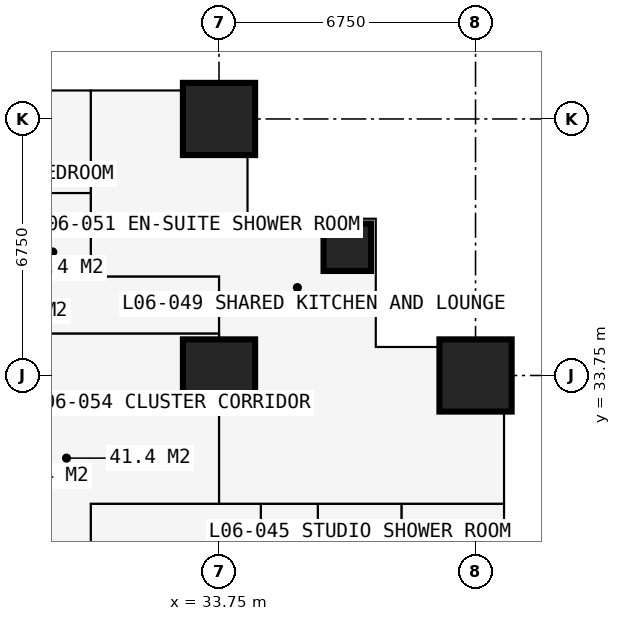
"""IFC4 building model, lengths in metres.
Left out: names, types, materials, properties, quantities, classifications, styles, units other than length and angle.
Written with IfcOpenShell. Run it as: python <this file> out.ifc"""

import sys

from ifc_helpers import new_model, si_unit, direction, frame, frame_2d, origin, origin_2d, place, context, subcontext, project, spatial, rectangle, extrude, element, fill, save


model = new_model("IFC4")
c1 = context("Model", 3, precision=1e-05, world=origin(), true_north=direction((0.0, 1.0)))
c2 = subcontext(c1, "Body", "Model", "MODEL_VIEW")
j1 = project(units=[si_unit("LENGTHUNIT", "METRE"), si_unit("PLANEANGLEUNIT", "RADIAN")], contexts=[c1])
p1 = place(None, origin())
s1 = spatial("IfcSite", under=j1, at=p1, CompositionType="ELEMENT")
p2 = place(p1, origin())
s2 = spatial("IfcBuilding", under=s1, at=p2, CompositionType="ELEMENT")
p3 = place(p2, frame((0.0, 0.0, 25.2)))
s3 = spatial("IfcBuildingStorey", under=s2, at=p3, CompositionType="ELEMENT", Elevation=25.2)
for number, where, z_axis, x_axis in (
    (1, (33.75, 33.75, 0.0), (0.0, 0.0, 1.0), (1.0, 0.0, 0.0)),
    (2, (33.75, 40.5, 0.0), (0.0, 0.0, 1.0), (1.0, 0.0, 0.0)),
):
    element("IfcColumn", number, at=place(p3, frame(where, z_axis=z_axis, x_axis=x_axis)), inside=s3, PredefinedType="COLUMN", context=c2, shape_type="SweptSolid", body=[
        extrude(rectangle(XDim=1.9, YDim=1.9, at=origin_2d()), origin(), (0.0, 0.0, 1.0), 3.6),
    ])
p4 = place(p3, frame((37.125, 37.125, 0.0), z_axis=(0.0, 0.0, 1.0), x_axis=(1.0, 0.0, 0.0)))
e3 = element("IfcColumn", 3, at=p4, inside=s3, PredefinedType="COLUMN", context=c2, shape_type="SweptSolid", body=[
    extrude(rectangle(XDim=1.25, YDim=1.25, at=origin_2d()), origin(), (0.0, 0.0, 1.0), 3.6),
])
p5 = place(p3, frame((40.5, 33.75, 0.0), z_axis=(0.0, 0.0, 1.0), x_axis=(1.0, 0.0, 0.0)))
e4 = element("IfcColumn", 4, at=p5, inside=s3, PredefinedType="COLUMN", context=c2, shape_type="SweptSolid", body=[
    extrude(rectangle(XDim=1.9, YDim=1.9, at=origin_2d()), origin(), (0.0, 0.0, 1.0), 3.6),
])
p6 = place(p3, frame((41.25, 34.5, 0.0), z_axis=(0.0, 0.0, 1.0), x_axis=(-1.0, 0.0, 0.0)))
e5 = element("IfcWall", 5, at=p6, inside=s3, PredefinedType="SOLIDWALL", context=c2, shape_type="SweptSolid", body=[
    extrude(rectangle(XDim=3.375, YDim=0.3, at=frame_2d((1.688, 0.0))), origin(), (0.0, 0.0, 1.0), 3.375),
])
p7 = place(p6, frame((1.857, 0.0, 0.9)))
e6 = element("IfcOpeningElement", 6, at=p7, cuts=e5, PredefinedType="OPENING", context=c2, shape_type="SweptSolid", body=[
    extrude(rectangle(XDim=1.2, YDim=1.8, at=frame_2d((0.6, 0.9))), frame((0.0, 0.16, 0.0), z_axis=(0.0, -1.0, 0.0), x_axis=(1.0, 0.0, 0.0)), (0.0, 0.0, 1.0), 0.32),
])
p8 = place(p3, frame((37.875, 34.5, 0.0), z_axis=(0.0, 0.0, 1.0), x_axis=(0.0, 1.0, 0.0)))
e7 = element("IfcWall", 7, at=p8, inside=s3, PredefinedType="SOLIDWALL", context=c2, shape_type="SweptSolid", body=[
    extrude(rectangle(XDim=3.375, YDim=0.3, at=frame_2d((1.688, 0.0))), origin(), (0.0, 0.0, 1.0), 3.375),
])
p9 = place(p8, frame((0.788, 0.0, 0.6)))
e8 = element("IfcOpeningElement", 8, at=p9, cuts=e7, PredefinedType="OPENING", context=c2, shape_type="SweptSolid", body=[
    extrude(rectangle(XDim=1.8, YDim=2.1, at=frame_2d((0.9, 1.05))), frame((0.0, 0.16, 0.0), z_axis=(0.0, -1.0, 0.0), x_axis=(1.0, 0.0, 0.0)), (0.0, 0.0, 1.0), 0.32),
])
p10 = place(p3, frame((37.875, 37.875, 0.0), z_axis=(0.0, 0.0, 1.0), x_axis=(-1.0, 0.0, 0.0)))
e9 = element("IfcWall", 9, at=p10, inside=s3, PredefinedType="SOLIDWALL", context=c2, shape_type="SweptSolid", body=[
    extrude(rectangle(XDim=3.375, YDim=0.3, at=frame_2d((1.688, 0.0))), origin(), (0.0, 0.0, 1.0), 3.375),
])
p11 = place(p10, frame((0.788, 0.0, 0.6)))
e10 = element("IfcOpeningElement", 10, at=p11, cuts=e9, PredefinedType="OPENING", context=c2, shape_type="SweptSolid", body=[
    extrude(rectangle(XDim=1.8, YDim=2.1, at=frame_2d((0.9, 1.05))), frame((0.0, 0.16, 0.0), z_axis=(0.0, -1.0, 0.0), x_axis=(1.0, 0.0, 0.0)), (0.0, 0.0, 1.0), 0.32),
])
p12 = place(p3, frame((34.5, 37.875, 0.0), z_axis=(0.0, 0.0, 1.0), x_axis=(0.0, 1.0, 0.0)))
e11 = element("IfcWall", 11, at=p12, inside=s3, PredefinedType="SOLIDWALL", context=c2, shape_type="SweptSolid", body=[
    extrude(rectangle(XDim=3.375, YDim=0.3, at=frame_2d((1.688, 0.0))), origin(), (0.0, 0.0, 1.0), 3.375),
])
p13 = place(p12, frame((0.317, 0.0, 0.9)))
e12 = element("IfcOpeningElement", 12, at=p13, cuts=e11, PredefinedType="OPENING", context=c2, shape_type="SweptSolid", body=[
    extrude(rectangle(XDim=1.2, YDim=1.8, at=frame_2d((0.6, 0.9))), frame((0.0, 0.16, 0.0), z_axis=(0.0, -1.0, 0.0), x_axis=(1.0, 0.0, 0.0)), (0.0, 0.0, 1.0), 0.32),
])
p14 = place(p3, frame((10.125, 36.35, 0.0), z_axis=(0.0, 0.0, 1.0), x_axis=(1.0, 0.0, 0.0)))
e13 = element("IfcWall", 13, at=p14, inside=s3, PredefinedType="PARTITIONING", context=c2, shape_type="SweptSolid", body=[
    extrude(rectangle(XDim=23.625, YDim=0.1, at=frame_2d((11.812, 0.0))), origin(), (0.0, 0.0, 1.0), 3.375),
])
p15 = place(p14, frame((21.45, 0.0, 0.0)))
e14 = element("IfcOpeningElement", 14, at=p15, cuts=e13, PredefinedType="OPENING", context=c2, shape_type="SweptSolid", body=[
    extrude(rectangle(XDim=1.0, YDim=2.2, at=frame_2d((0.5, 1.1))), frame((0.0, 0.06, 0.0), z_axis=(0.0, -1.0, 0.0), x_axis=(1.0, 0.0, 0.0)), (0.0, 0.0, 1.0), 0.12),
])
p16 = place(p14, frame((17.125, 0.0, 0.0)))
e15 = element("IfcOpeningElement", 15, at=p16, cuts=e13, PredefinedType="OPENING", context=c2, shape_type="SweptSolid", body=[
    extrude(rectangle(XDim=0.95, YDim=2.2, at=frame_2d((0.475, 1.1))), frame((0.0, 0.06, 0.0), z_axis=(0.0, -1.0, 0.0), x_axis=(1.0, 0.0, 0.0)), (0.0, 0.0, 1.0), 0.12),
])
p17 = place(p14, frame((13.7, 0.0, 0.0)))
e16 = element("IfcOpeningElement", 16, at=p17, cuts=e13, PredefinedType="OPENING", context=c2, shape_type="SweptSolid", body=[
    extrude(rectangle(XDim=0.95, YDim=2.2, at=frame_2d((0.475, 1.1))), frame((0.0, 0.06, 0.0), z_axis=(0.0, -1.0, 0.0), x_axis=(1.0, 0.0, 0.0)), (0.0, 0.0, 1.0), 0.12),
])
p18 = place(p14, frame((0.2, 0.0, 0.0)))
e17 = element("IfcOpeningElement", 17, at=p18, cuts=e13, PredefinedType="OPENING", context=c2, shape_type="SweptSolid", body=[
    extrude(rectangle(XDim=0.95, YDim=2.2, at=frame_2d((0.475, 1.1))), frame((0.0, 0.06, 0.0), z_axis=(0.0, -1.0, 0.0), x_axis=(1.0, 0.0, 0.0)), (0.0, 0.0, 1.0), 0.12),
])
p19 = place(p14, frame((3.625, 0.0, 0.0)))
e18 = element("IfcOpeningElement", 18, at=p19, cuts=e13, PredefinedType="OPENING", context=c2, shape_type="SweptSolid", body=[
    extrude(rectangle(XDim=0.95, YDim=2.2, at=frame_2d((0.475, 1.1))), frame((0.0, 0.06, 0.0), z_axis=(0.0, -1.0, 0.0), x_axis=(1.0, 0.0, 0.0)), (0.0, 0.0, 1.0), 0.12),
])
p20 = place(p14, frame((7.0, 0.0, 0.0)))
e19 = element("IfcOpeningElement", 19, at=p20, cuts=e13, PredefinedType="OPENING", context=c2, shape_type="SweptSolid", body=[
    extrude(rectangle(XDim=0.95, YDim=2.2, at=frame_2d((0.475, 1.1))), frame((0.0, 0.06, 0.0), z_axis=(0.0, -1.0, 0.0), x_axis=(1.0, 0.0, 0.0)), (0.0, 0.0, 1.0), 0.12),
])
p21 = place(p14, frame((10.375, 0.0, 0.0)))
e20 = element("IfcOpeningElement", 20, at=p21, cuts=e13, PredefinedType="OPENING", context=c2, shape_type="SweptSolid", body=[
    extrude(rectangle(XDim=0.95, YDim=2.2, at=frame_2d((0.475, 1.1))), frame((0.0, 0.06, 0.0), z_axis=(0.0, -1.0, 0.0), x_axis=(1.0, 0.0, 0.0)), (0.0, 0.0, 1.0), 0.12),
])
p22 = place(p3, frame((25.725, 34.85, 0.0), z_axis=(0.0, 0.0, 1.0), x_axis=(1.0, 0.0, 0.0)))
e21 = element("IfcWall", 21, at=p22, inside=s3, PredefinedType="PARTITIONING", context=c2, shape_type="SweptSolid", body=[
    extrude(rectangle(XDim=8.025, YDim=0.15, at=frame_2d((4.012, 0.0))), origin(), (0.0, 0.0, 1.0), 3.375),
])
p23 = place(p3, frame((28.375, 38.55, 0.0), z_axis=(0.0, 0.0, 1.0), x_axis=(1.0, 0.0, 0.0)))
e22 = element("IfcWall", 22, at=p23, inside=s3, PredefinedType="PARTITIONING", context=c2, shape_type="SweptSolid", body=[
    extrude(rectangle(XDim=2.0, YDim=0.1, at=frame_2d((1.0, 0.0))), origin(), (0.0, 0.0, 1.0), 3.375),
])
p24 = place(p3, frame((30.375, 29.2, 0.0), z_axis=(0.0, 0.0, 1.0), x_axis=(0.0, 1.0, 0.0)))
e23 = element("IfcWall", 23, at=p24, inside=s3, PredefinedType="PARTITIONING", context=c2, shape_type="SweptSolid", body=[
    extrude(rectangle(XDim=1.175, YDim=0.15, at=frame_2d((0.587, 0.0))), origin(), (0.0, 0.0, 1.0), 3.375),
])
p25 = place(p3, frame((30.375, 30.375, 0.0), z_axis=(0.0, 0.0, 1.0), x_axis=(1.0, 0.0, 0.0)))
e24 = element("IfcWall", 24, at=p25, inside=s3, PredefinedType="PARTITIONING", context=c2, shape_type="SweptSolid", body=[
    extrude(rectangle(XDim=10.859, YDim=0.15, at=frame_2d((5.429, 0.0))), origin(), (0.0, 0.0, 1.0), 3.375),
])
p26 = place(p3, frame((30.375, 36.35, 0.0), z_axis=(0.0, 0.0, 1.0), x_axis=(0.0, 1.0, 0.0)))
e25 = element("IfcWall", 25, at=p26, inside=s3, PredefinedType="PARTITIONING", context=c2, shape_type="SweptSolid", body=[
    extrude(rectangle(XDim=4.884, YDim=0.15, at=frame_2d((2.442, 0.0))), origin(), (0.0, 0.0, 1.0), 3.375),
])
p27 = place(p3, frame((33.75, 30.375, 0.0), z_axis=(0.0, 0.0, 1.0), x_axis=(0.0, 1.0, 0.0)))
e26 = element("IfcWall", 26, at=p27, inside=s3, PredefinedType="PARTITIONING", context=c2, shape_type="SweptSolid", body=[
    extrude(rectangle(XDim=5.975, YDim=0.15, at=frame_2d((2.988, 0.0))), origin(), (0.0, 0.0, 1.0), 2.877),
])
p28 = place(p3, frame((34.85, 12.55, 0.0), z_axis=(0.0, 0.0, 1.0), x_axis=(0.0, 1.0, 0.0)))
e27 = element("IfcWall", 27, at=p28, inside=s3, PredefinedType="PARTITIONING", context=c2, shape_type="SweptSolid", body=[
    extrude(rectangle(XDim=17.825, YDim=0.15, at=frame_2d((8.913, 0.0))), origin(), (0.0, 0.0, 1.0), 3.375),
])
p29 = place(p28, frame((8.65, 0.0, 0.0)))
e28 = element("IfcOpeningElement", 28, at=p29, cuts=e27, PredefinedType="OPENING", context=c2, shape_type="SweptSolid", body=[
    extrude(rectangle(XDim=0.95, YDim=2.2, at=frame_2d((0.475, 1.1))), frame((0.0, 0.085, 0.0), z_axis=(0.0, -1.0, 0.0), x_axis=(1.0, 0.0, 0.0)), (0.0, 0.0, 1.0), 0.17),
])
p30 = place(p3, frame((36.35, 6.75, 0.0), z_axis=(0.0, 0.0, 1.0), x_axis=(0.0, 1.0, 0.0)))
e29 = element("IfcWall", 29, at=p30, inside=s3, PredefinedType="PARTITIONING", context=c2, shape_type="SweptSolid", body=[
    extrude(rectangle(XDim=23.625, YDim=0.1, at=frame_2d((11.812, 0.0))), origin(), (0.0, 0.0, 1.0), 3.375),
])
p31 = place(p30, frame((3.575, 0.0, 0.0)))
e30 = element("IfcOpeningElement", 30, at=p31, cuts=e29, PredefinedType="OPENING", context=c2, shape_type="SweptSolid", body=[
    extrude(rectangle(XDim=0.95, YDim=2.2, at=frame_2d((0.475, 1.1))), frame((0.0, 0.06, 0.0), z_axis=(0.0, -1.0, 0.0), x_axis=(1.0, 0.0, 0.0)), (0.0, 0.0, 1.0), 0.12),
])
p32 = place(p30, frame((7.0, 0.0, 0.0)))
e31 = element("IfcOpeningElement", 31, at=p32, cuts=e29, PredefinedType="OPENING", context=c2, shape_type="SweptSolid", body=[
    extrude(rectangle(XDim=0.95, YDim=2.2, at=frame_2d((0.475, 1.1))), frame((0.0, 0.06, 0.0), z_axis=(0.0, -1.0, 0.0), x_axis=(1.0, 0.0, 0.0)), (0.0, 0.0, 1.0), 0.12),
])
p33 = place(p30, frame((10.375, 0.0, 0.0)))
e32 = element("IfcOpeningElement", 32, at=p33, cuts=e29, PredefinedType="OPENING", context=c2, shape_type="SweptSolid", body=[
    extrude(rectangle(XDim=0.95, YDim=2.2, at=frame_2d((0.475, 1.1))), frame((0.0, 0.06, 0.0), z_axis=(0.0, -1.0, 0.0), x_axis=(1.0, 0.0, 0.0)), (0.0, 0.0, 1.0), 0.12),
])
p34 = place(p30, frame((13.75, 0.0, 0.0)))
e33 = element("IfcOpeningElement", 33, at=p34, cuts=e29, PredefinedType="OPENING", context=c2, shape_type="SweptSolid", body=[
    extrude(rectangle(XDim=0.95, YDim=2.2, at=frame_2d((0.475, 1.1))), frame((0.0, 0.06, 0.0), z_axis=(0.0, -1.0, 0.0), x_axis=(1.0, 0.0, 0.0)), (0.0, 0.0, 1.0), 0.12),
])
p35 = place(p30, frame((17.125, 0.0, 0.0)))
e34 = element("IfcOpeningElement", 34, at=p35, cuts=e29, PredefinedType="OPENING", context=c2, shape_type="SweptSolid", body=[
    extrude(rectangle(XDim=0.95, YDim=2.2, at=frame_2d((0.475, 1.1))), frame((0.0, 0.06, 0.0), z_axis=(0.0, -1.0, 0.0), x_axis=(1.0, 0.0, 0.0)), (0.0, 0.0, 1.0), 0.12),
])
p36 = place(p30, frame((20.5, 0.0, 0.0)))
e35 = element("IfcOpeningElement", 35, at=p36, cuts=e29, PredefinedType="OPENING", context=c2, shape_type="SweptSolid", body=[
    extrude(rectangle(XDim=0.95, YDim=2.2, at=frame_2d((0.475, 1.1))), frame((0.0, 0.06, 0.0), z_axis=(0.0, -1.0, 0.0), x_axis=(1.0, 0.0, 0.0)), (0.0, 0.0, 1.0), 0.12),
])
p37 = place(p3, frame((38.55, 28.375, 0.0), z_axis=(0.0, 0.0, 1.0), x_axis=(0.0, 1.0, 0.0)))
e36 = element("IfcWall", 36, at=p37, inside=s3, PredefinedType="PARTITIONING", context=c2, shape_type="SweptSolid", body=[
    extrude(rectangle(XDim=2.0, YDim=0.1, at=frame_2d((1.0, 0.0))), origin(), (0.0, 0.0, 1.0), 3.375),
])
p38 = place(p7, origin())
e37 = element("IfcWindow", 37, at=p38, inside=s3, PartitioningType="SINGLE_PANEL", PredefinedType="WINDOW", context=c2, shape_type="SweptSolid", body=[
    extrude(rectangle(XDim=1.2, YDim=1.8, at=frame_2d((0.6, 0.9))), frame((0.0, 0.03, 0.0), z_axis=(0.0, -1.0, 0.0), x_axis=(1.0, 0.0, 0.0)), (0.0, 0.0, 1.0), 0.06),
])
fill(e6, e37)
p39 = place(p9, origin())
e38 = element("IfcWindow", 38, at=p39, inside=s3, PartitioningType="SINGLE_PANEL", PredefinedType="WINDOW", context=c2, shape_type="SweptSolid", body=[
    extrude(rectangle(XDim=1.8, YDim=2.1, at=frame_2d((0.9, 1.05))), frame((0.0, 0.03, 0.0), z_axis=(0.0, -1.0, 0.0), x_axis=(1.0, 0.0, 0.0)), (0.0, 0.0, 1.0), 0.06),
])
fill(e8, e38)
p40 = place(p11, origin())
e39 = element("IfcWindow", 39, at=p40, inside=s3, PartitioningType="SINGLE_PANEL", PredefinedType="WINDOW", context=c2, shape_type="SweptSolid", body=[
    extrude(rectangle(XDim=1.8, YDim=2.1, at=frame_2d((0.9, 1.05))), frame((0.0, 0.03, 0.0), z_axis=(0.0, -1.0, 0.0), x_axis=(1.0, 0.0, 0.0)), (0.0, 0.0, 1.0), 0.06),
])
fill(e10, e39)
p41 = place(p13, origin())
e40 = element("IfcWindow", 40, at=p41, inside=s3, PartitioningType="SINGLE_PANEL", PredefinedType="WINDOW", context=c2, shape_type="SweptSolid", body=[
    extrude(rectangle(XDim=1.2, YDim=1.8, at=frame_2d((0.6, 0.9))), frame((0.0, 0.03, 0.0), z_axis=(0.0, -1.0, 0.0), x_axis=(1.0, 0.0, 0.0)), (0.0, 0.0, 1.0), 0.06),
])
fill(e12, e40)
p42 = place(p15, origin())
e41 = element("IfcDoor", 41, at=p42, inside=s3, OperationType="SINGLE_SWING_LEFT", PredefinedType="DOOR", context=c2, shape_type="SweptSolid", body=[
    extrude(rectangle(XDim=1.0, YDim=2.2, at=frame_2d((0.5, 1.1))), frame((0.0, 0.025, 0.0), z_axis=(0.0, -1.0, 0.0), x_axis=(1.0, 0.0, 0.0)), (0.0, 0.0, 1.0), 0.05),
])
fill(e14, e41)
save(model, sys.argv[1])
